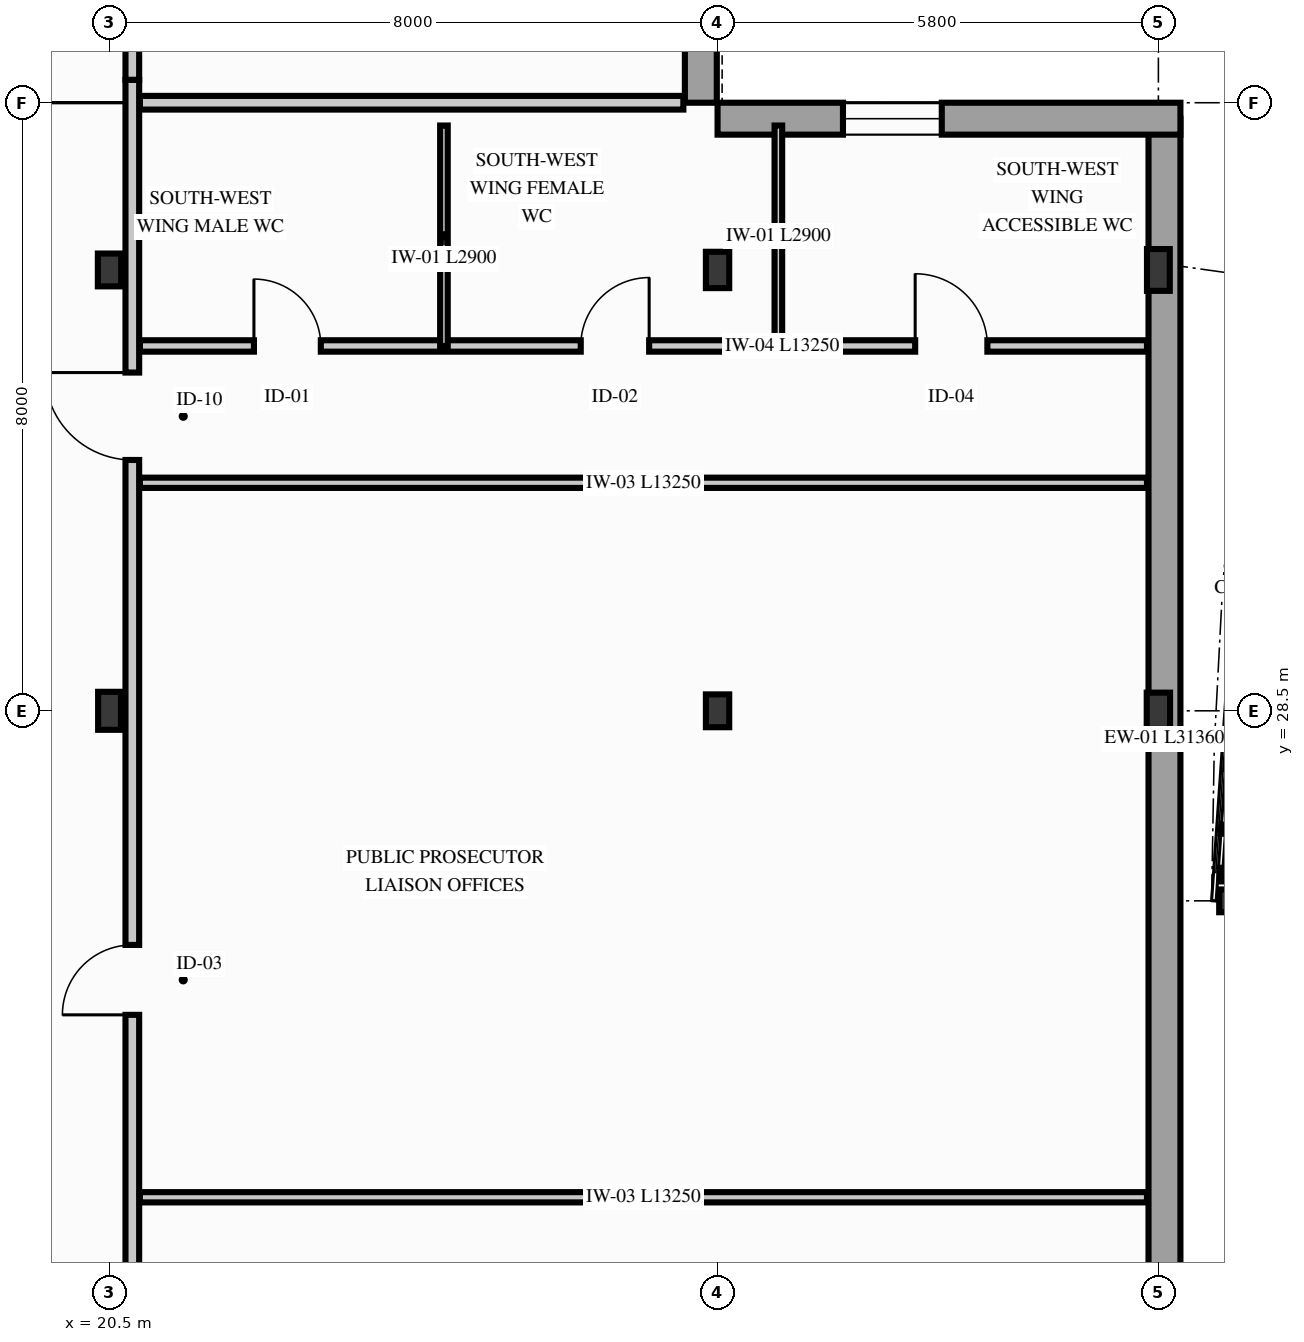
"""IFC4 building model, lengths in metres.
Left out: names, types, materials, properties, quantities, classifications, styles, units other than length and angle.
Written with IfcOpenShell. Run it as: python <this file> out.ifc"""

import sys

from ifc_helpers import new_model, si_unit, direction, frame, frame_2d, origin, origin_2d, place, context, subcontext, project, spatial, rectangle, i_section, extrude, element, fill, save


model = new_model("IFC4")
c1 = context("Model", 3, precision=1e-05, world=origin(), true_north=direction((0.0, 1.0)))
c2 = subcontext(c1, "Body", "Model", "MODEL_VIEW")
j1 = project(units=[si_unit("LENGTHUNIT", "METRE"), si_unit("PLANEANGLEUNIT", "RADIAN")], contexts=[c1])
p1 = place(None, origin())
s1 = spatial("IfcSite", under=j1, at=p1, CompositionType="ELEMENT")
p2 = place(p1, origin())
s2 = spatial("IfcBuilding", under=s1, at=p2, CompositionType="ELEMENT")
p3 = place(p2, frame((0.0, 0.0, 9.3)))
s3 = spatial("IfcBuildingStorey", under=s2, at=p3, CompositionType="ELEMENT", Elevation=9.3)
for number, where, z_axis, x_axis in (
    (1, (35.35, 26.0, 0.0), (0.0, 0.0, 1.0), (0.0, 1.0, 0.0)),
    (2, (20.5, 28.5, 0.0), (0.0, 0.0, 1.0), (1.0, 0.0, 0.0)),
):
    element("IfcColumn", number, at=place(p3, frame(where, z_axis=z_axis, x_axis=x_axis)), inside=s3, PredefinedType="COLUMN", context=c2, shape_type="SweptSolid", body=[
        extrude(i_section(OverallWidth=0.3, OverallDepth=0.5, WebThickness=0.014, FlangeThickness=0.028, FilletRadius=0.027, at=origin_2d()), origin(), (0.0, 0.0, 1.0), 4.2),
    ])
p4 = place(p3, frame((20.5, 34.3, 0.0), z_axis=(0.0, 0.0, 1.0), x_axis=(1.0, 0.0, 0.0)))
e3 = element("IfcColumn", 3, at=p4, inside=s3, PredefinedType="COLUMN", context=c2, shape_type="SweptSolid", body=[
    extrude(i_section(OverallWidth=0.307, OverallDepth=0.432, WebThickness=0.021, FlangeThickness=0.04, FilletRadius=0.027, at=origin_2d()), origin(), (0.0, 0.0, 1.0), 4.2),
])
p5 = place(p3, frame((28.5, 28.5, 0.0), z_axis=(0.0, 0.0, 1.0), x_axis=(1.0, 0.0, 0.0)))
e4 = element("IfcColumn", 4, at=p5, inside=s3, PredefinedType="COLUMN", context=c2, shape_type="SweptSolid", body=[
    extrude(i_section(OverallWidth=0.307, OverallDepth=0.432, WebThickness=0.021, FlangeThickness=0.04, FilletRadius=0.027, at=origin_2d()), origin(), (0.0, 0.0, 1.0), 3.94),
])
for number, where, z_axis, x_axis in (
    (5, (28.5, 34.3, 0.0), (0.0, 0.0, 1.0), (1.0, 0.0, 0.0)),
    (6, (34.3, 28.5, 0.0), (0.0, 0.0, 1.0), (1.0, 0.0, 0.0)),
):
    element("IfcColumn", number, at=place(p3, frame(where, z_axis=z_axis, x_axis=x_axis)), inside=s3, PredefinedType="COLUMN", context=c2, shape_type="SweptSolid", body=[
        extrude(i_section(OverallWidth=0.307, OverallDepth=0.478, WebThickness=0.021, FlangeThickness=0.04, FilletRadius=0.027, at=origin_2d()), origin(), (0.0, 0.0, 1.0), 3.94),
    ])
p6 = place(p3, frame((34.3, 34.3, 0.0), z_axis=(0.0, 0.0, 1.0), x_axis=(1.0, 0.0, 0.0)))
e7 = element("IfcColumn", 7, at=p6, inside=s3, PredefinedType="COLUMN", context=c2, shape_type="SweptSolid", body=[
    extrude(i_section(OverallWidth=0.3, OverallDepth=0.55, WebThickness=0.015, FlangeThickness=0.029, FilletRadius=0.027, at=origin_2d()), origin(), (0.0, 0.0, 1.0), 3.94),
])
p7 = place(p3, frame((34.38, 4.93, 0.0), z_axis=(0.0, 0.0, 1.0), x_axis=(0.0, 1.0, 0.0)))
e8 = element("IfcWall", 8, at=p7, inside=s3, PredefinedType="SOLIDWALL", context=c2, shape_type="SweptSolid", body=[
    extrude(rectangle(XDim=31.36, YDim=0.42, at=frame_2d((15.68, 0.0))), origin(), (0.0, 0.0, 1.0), 3.62),
])
p8 = place(p7, frame((1.65, 0.0, 0.85)))
e9 = element("IfcOpeningElement", 9, at=p8, cuts=e8, PredefinedType="OPENING", context=c2, shape_type="SweptSolid", body=[
    extrude(rectangle(XDim=1.3, YDim=2.15, at=frame_2d((0.65, 1.075))), frame((0.0, 0.22, 0.0), z_axis=(0.0, -1.0, 0.0), x_axis=(1.0, 0.0, 0.0)), (0.0, 0.0, 1.0), 0.44),
])
p9 = place(p7, frame((9.65, 0.0, 0.74)))
e10 = element("IfcOpeningElement", 10, at=p9, cuts=e8, PredefinedType="OPENING", context=c2, shape_type="SweptSolid", body=[
    extrude(rectangle(XDim=1.6, YDim=2.4, at=frame_2d((0.8, 1.2))), frame((0.0, 0.22, 0.0), z_axis=(0.0, -1.0, 0.0), x_axis=(1.0, 0.0, 0.0)), (0.0, 0.0, 1.0), 0.44),
])
p10 = place(p7, frame((13.65, 0.0, 0.85)))
e11 = element("IfcOpeningElement", 11, at=p10, cuts=e8, PredefinedType="OPENING", context=c2, shape_type="SweptSolid", body=[
    extrude(rectangle(XDim=1.4, YDim=2.2, at=frame_2d((0.7, 1.1))), frame((0.0, 0.22, 0.0), z_axis=(0.0, -1.0, 0.0), x_axis=(1.0, 0.0, 0.0)), (0.0, 0.0, 1.0), 0.44),
])
p11 = place(p3, frame((28.5, 36.29, 0.0), z_axis=(0.0, 0.0, 1.0), x_axis=(1.0, 0.0, 0.0)))
e12 = element("IfcWall", 12, at=p11, inside=s3, PredefinedType="SOLIDWALL", context=c2, shape_type="SweptSolid", body=[
    extrude(rectangle(XDim=6.09, YDim=0.42, at=frame_2d((3.045, 0.0))), origin(), (0.0, 0.0, 1.0), 3.94),
])
p12 = place(p11, frame((1.65, 0.0, 0.85)))
e13 = element("IfcOpeningElement", 13, at=p12, cuts=e12, PredefinedType="OPENING", context=c2, shape_type="SweptSolid", body=[
    extrude(rectangle(XDim=1.3, YDim=2.15, at=frame_2d((0.65, 1.075))), frame((0.0, 0.22, 0.0), z_axis=(0.0, -1.0, 0.0), x_axis=(1.0, 0.0, 0.0)), (0.0, 0.0, 1.0), 0.44),
])
p13 = place(p3, frame((28.28, 36.5, 0.0), z_axis=(0.0, 0.0, 1.0), x_axis=(0.0, 1.0, 0.0)))
e14 = element("IfcWall", 14, at=p13, inside=s3, PredefinedType="SOLIDWALL", context=c2, shape_type="SweptSolid", body=[
    extrude(rectangle(XDim=17.0, YDim=0.42, at=frame_2d((8.5, 0.0))), origin(), (0.0, 0.0, 1.0), 3.68),
])
p14 = place(p13, frame((1.65, 0.0, 0.74)))
e15 = element("IfcOpeningElement", 15, at=p14, cuts=e14, PredefinedType="OPENING", context=c2, shape_type="SweptSolid", body=[
    extrude(rectangle(XDim=1.6, YDim=2.4, at=frame_2d((0.8, 1.2))), frame((0.0, 0.22, 0.0), z_axis=(0.0, -1.0, 0.0), x_axis=(1.0, 0.0, 0.0)), (0.0, 0.0, 1.0), 0.44),
])
p15 = place(p13, frame((5.65, 0.0, 0.74)))
e16 = element("IfcOpeningElement", 16, at=p15, cuts=e14, PredefinedType="OPENING", context=c2, shape_type="SweptSolid", body=[
    extrude(rectangle(XDim=1.8, YDim=2.4, at=frame_2d((0.9, 1.2))), frame((0.0, 0.22, 0.0), z_axis=(0.0, -1.0, 0.0), x_axis=(1.0, 0.0, 0.0)), (0.0, 0.0, 1.0), 0.44),
])
p16 = place(p13, frame((9.65, 0.0, 0.84)))
e17 = element("IfcOpeningElement", 17, at=p16, cuts=e14, PredefinedType="OPENING", context=c2, shape_type="SweptSolid", body=[
    extrude(rectangle(XDim=1.5, YDim=2.3, at=frame_2d((0.75, 1.15))), frame((0.0, 0.22, 0.0), z_axis=(0.0, -1.0, 0.0), x_axis=(1.0, 0.0, 0.0)), (0.0, 0.0, 1.0), 0.44),
])
p17 = place(p3, frame((20.8, 36.8, 0.0), z_axis=(0.0, 0.0, 1.0), x_axis=(0.0, 1.0, 0.0)))
e18 = element("IfcWall", 18, at=p17, inside=s3, PredefinedType="PARTITIONING", context=c2, shape_type="SweptSolid", body=[
    extrude(rectangle(XDim=38.05, YDim=0.18, at=frame_2d((19.025, 0.0))), origin(), (0.0, 0.0, 1.0), 3.678),
])
p18 = place(p17, frame((5.65, 0.0, 0.0)))
e19 = element("IfcOpeningElement", 19, at=p18, cuts=e18, PredefinedType="OPENING", context=c2, shape_type="SweptSolid", body=[
    extrude(rectangle(XDim=1.08, YDim=2.22, at=frame_2d((0.54, 1.11))), frame((0.0, 0.1, 0.0), z_axis=(0.0, -1.0, 0.0), x_axis=(1.0, 0.0, 0.0)), (0.0, 0.0, 1.0), 0.2),
])
p19 = place(p17, frame((20.0, 0.0, 0.0)))
e20 = element("IfcOpeningElement", 20, at=p19, cuts=e18, PredefinedType="OPENING", context=c2, shape_type="SweptSolid", body=[
    extrude(rectangle(XDim=1.05, YDim=2.2, at=frame_2d((0.525, 1.1))), frame((0.0, 0.1, 0.0), z_axis=(0.0, -1.0, 0.0), x_axis=(1.0, 0.0, 0.0)), (0.0, 0.0, 1.0), 0.2),
])
p20 = place(p17, frame((32.9, 0.0, 0.0)))
e21 = element("IfcOpeningElement", 21, at=p20, cuts=e18, PredefinedType="OPENING", context=c2, shape_type="SweptSolid", body=[
    extrude(rectangle(XDim=1.02, YDim=2.18, at=frame_2d((0.51, 1.09))), frame((0.0, 0.1, 0.0), z_axis=(0.0, -1.0, 0.0), x_axis=(1.0, 0.0, 0.0)), (0.0, 0.0, 1.0), 0.2),
])
p21 = place(p3, frame((20.8, 5.0, 0.0), z_axis=(0.0, 0.0, 1.0), x_axis=(0.0, 1.0, 0.0)))
e22 = element("IfcWall", 22, at=p21, inside=s3, PredefinedType="PARTITIONING", context=c2, shape_type="SweptSolid", body=[
    extrude(rectangle(XDim=31.8, YDim=0.18, at=frame_2d((15.9, 0.0))), origin(), (0.0, 0.0, 1.0), 3.618),
])
p22 = place(p21, frame((8.4, 0.0, 0.0)))
e23 = element("IfcOpeningElement", 23, at=p22, cuts=e22, PredefinedType="OPENING", context=c2, shape_type="SweptSolid", body=[
    extrude(rectangle(XDim=0.98, YDim=2.16, at=frame_2d((0.49, 1.08))), frame((0.0, 0.1, 0.0), z_axis=(0.0, -1.0, 0.0), x_axis=(1.0, 0.0, 0.0)), (0.0, 0.0, 1.0), 0.2),
])
p23 = place(p21, frame((19.5, 0.0, 0.0)))
e24 = element("IfcOpeningElement", 24, at=p23, cuts=e22, PredefinedType="OPENING", context=c2, shape_type="SweptSolid", body=[
    extrude(rectangle(XDim=0.92, YDim=2.12, at=frame_2d((0.46, 1.06))), frame((0.0, 0.1, 0.0), z_axis=(0.0, -1.0, 0.0), x_axis=(1.0, 0.0, 0.0)), (0.0, 0.0, 1.0), 0.2),
])
p24 = place(p21, frame((26.8, 0.0, 0.0)))
e25 = element("IfcOpeningElement", 25, at=p24, cuts=e22, PredefinedType="OPENING", context=c2, shape_type="SweptSolid", body=[
    extrude(rectangle(XDim=1.15, YDim=2.2, at=frame_2d((0.575, 1.1))), frame((0.0, 0.1, 0.0), z_axis=(0.0, -1.0, 0.0), x_axis=(1.0, 0.0, 0.0)), (0.0, 0.0, 1.0), 0.2),
])
p25 = place(p3, frame((20.9, 36.5, 0.0), z_axis=(0.0, 0.0, 1.0), x_axis=(1.0, 0.0, 0.0)))
e26 = element("IfcWall", 26, at=p25, inside=s3, PredefinedType="PARTITIONING", context=c2, shape_type="SweptSolid", body=[
    extrude(rectangle(XDim=7.15, YDim=0.18, at=frame_2d((3.575, 0.0))), origin(), (0.0, 0.0, 1.0), 3.92),
])
p26 = place(p3, frame((20.9, 22.1, 0.0), z_axis=(0.0, 0.0, 1.0), x_axis=(1.0, 0.0, 0.0)))
e27 = element("IfcWall", 27, at=p26, inside=s3, PredefinedType="PARTITIONING", context=c2, shape_type="SweptSolid", body=[
    extrude(rectangle(XDim=13.25, YDim=0.135, at=frame_2d((6.625, 0.0))), origin(), (0.0, 0.0, 1.0), 3.488),
])
p27 = place(p3, frame((20.9, 33.3, 0.0), z_axis=(0.0, 0.0, 1.0), x_axis=(1.0, 0.0, 0.0)))
e28 = element("IfcWall", 28, at=p27, inside=s3, PredefinedType="PARTITIONING", context=c2, shape_type="SweptSolid", body=[
    extrude(rectangle(XDim=13.25, YDim=0.15, at=frame_2d((6.625, 0.0))), origin(), (0.0, 0.0, 1.0), 3.488),
])
p28 = place(p27, frame((1.5, 0.0, 0.0)))
e29 = element("IfcOpeningElement", 29, at=p28, cuts=e28, PredefinedType="OPENING", context=c2, shape_type="SweptSolid", body=[
    extrude(rectangle(XDim=0.88, YDim=2.1, at=frame_2d((0.44, 1.05))), frame((0.0, 0.085, 0.0), z_axis=(0.0, -1.0, 0.0), x_axis=(1.0, 0.0, 0.0)), (0.0, 0.0, 1.0), 0.17),
])
p29 = place(p27, frame((5.8, 0.0, 0.0)))
e30 = element("IfcOpeningElement", 30, at=p29, cuts=e28, PredefinedType="OPENING", context=c2, shape_type="SweptSolid", body=[
    extrude(rectangle(XDim=0.9, YDim=2.1, at=frame_2d((0.45, 1.05))), frame((0.0, 0.085, 0.0), z_axis=(0.0, -1.0, 0.0), x_axis=(1.0, 0.0, 0.0)), (0.0, 0.0, 1.0), 0.17),
])
p30 = place(p27, frame((10.2, 0.0, 0.0)))
e31 = element("IfcOpeningElement", 31, at=p30, cuts=e28, PredefinedType="OPENING", context=c2, shape_type="SweptSolid", body=[
    extrude(rectangle(XDim=0.95, YDim=2.15, at=frame_2d((0.475, 1.075))), frame((0.0, 0.085, 0.0), z_axis=(0.0, -1.0, 0.0), x_axis=(1.0, 0.0, 0.0)), (0.0, 0.0, 1.0), 0.17),
])
p31 = place(p3, frame((20.9, 31.5, 0.0), z_axis=(0.0, 0.0, 1.0), x_axis=(1.0, 0.0, 0.0)))
e32 = element("IfcWall", 32, at=p31, inside=s3, PredefinedType="PARTITIONING", context=c2, shape_type="SweptSolid", body=[
    extrude(rectangle(XDim=13.25, YDim=0.135, at=frame_2d((6.625, 0.0))), origin(), (0.0, 0.0, 1.0), 3.488),
])
for number, where, z_axis, x_axis in (
    (33, (24.9, 33.3, 0.0), (0.0, 0.0, 1.0), (0.0, 1.0, 0.0)),
    (34, (29.3, 33.3, 0.0), (0.0, 0.0, 1.0), (0.0, 1.0, 0.0)),
):
    element("IfcWall", number, at=place(p3, frame(where, z_axis=z_axis, x_axis=x_axis)), inside=s3, PredefinedType="PARTITIONING", context=c2, shape_type="SweptSolid", body=[
        extrude(rectangle(XDim=2.9, YDim=0.1, at=frame_2d((1.45, 0.0))), origin(), (0.0, 0.0, 1.0), 3.92),
    ])
p32 = place(p12, origin())
e35 = element("IfcWindow", 35, at=p32, inside=s3, PartitioningType="SINGLE_PANEL", PredefinedType="WINDOW", context=c2, shape_type="SweptSolid", body=[
    extrude(rectangle(XDim=1.3, YDim=2.15, at=frame_2d((0.65, 1.075))), frame((0.0, 0.03, 0.0), z_axis=(0.0, -1.0, 0.0), x_axis=(1.0, 0.0, 0.0)), (0.0, 0.0, 1.0), 0.06),
])
fill(e13, e35)
p33 = place(p23, origin())
e36 = element("IfcDoor", 36, at=p33, inside=s3, OperationType="SINGLE_SWING_LEFT", PredefinedType="DOOR", context=c2, shape_type="SweptSolid", body=[
    extrude(rectangle(XDim=0.92, YDim=2.12, at=frame_2d((0.46, 1.06))), frame((0.0, 0.025, 0.0), z_axis=(0.0, -1.0, 0.0), x_axis=(1.0, 0.0, 0.0)), (0.0, 0.0, 1.0), 0.05),
])
fill(e24, e36)
p34 = place(p24, origin())
e37 = element("IfcDoor", 37, at=p34, inside=s3, OperationType="SINGLE_SWING_RIGHT", PredefinedType="DOOR", context=c2, shape_type="SweptSolid", body=[
    extrude(rectangle(XDim=1.15, YDim=2.2, at=frame_2d((0.575, 1.1))), frame((0.0, 0.025, 0.0), z_axis=(0.0, -1.0, 0.0), x_axis=(1.0, 0.0, 0.0)), (0.0, 0.0, 1.0), 0.05),
])
fill(e25, e37)
p35 = place(p28, origin())
e38 = element("IfcDoor", 38, at=p35, inside=s3, OperationType="SINGLE_SWING_LEFT", PredefinedType="DOOR", context=c2, shape_type="SweptSolid", body=[
    extrude(rectangle(XDim=0.88, YDim=2.1, at=frame_2d((0.44, 1.05))), frame((0.0, 0.025, 0.0), z_axis=(0.0, -1.0, 0.0), x_axis=(1.0, 0.0, 0.0)), (0.0, 0.0, 1.0), 0.05),
])
fill(e29, e38)
p36 = place(p29, origin())
e39 = element("IfcDoor", 39, at=p36, inside=s3, OperationType="SINGLE_SWING_RIGHT", PredefinedType="DOOR", context=c2, shape_type="SweptSolid", body=[
    extrude(rectangle(XDim=0.9, YDim=2.1, at=frame_2d((0.45, 1.05))), frame((0.0, 0.025, 0.0), z_axis=(0.0, -1.0, 0.0), x_axis=(1.0, 0.0, 0.0)), (0.0, 0.0, 1.0), 0.05),
])
fill(e30, e39)
p37 = place(p30, origin())
e40 = element("IfcDoor", 40, at=p37, inside=s3, OperationType="SINGLE_SWING_LEFT", PredefinedType="DOOR", context=c2, shape_type="SweptSolid", body=[
    extrude(rectangle(XDim=0.95, YDim=2.15, at=frame_2d((0.475, 1.075))), frame((0.0, 0.025, 0.0), z_axis=(0.0, -1.0, 0.0), x_axis=(1.0, 0.0, 0.0)), (0.0, 0.0, 1.0), 0.05),
])
fill(e31, e40)
save(model, sys.argv[1])
